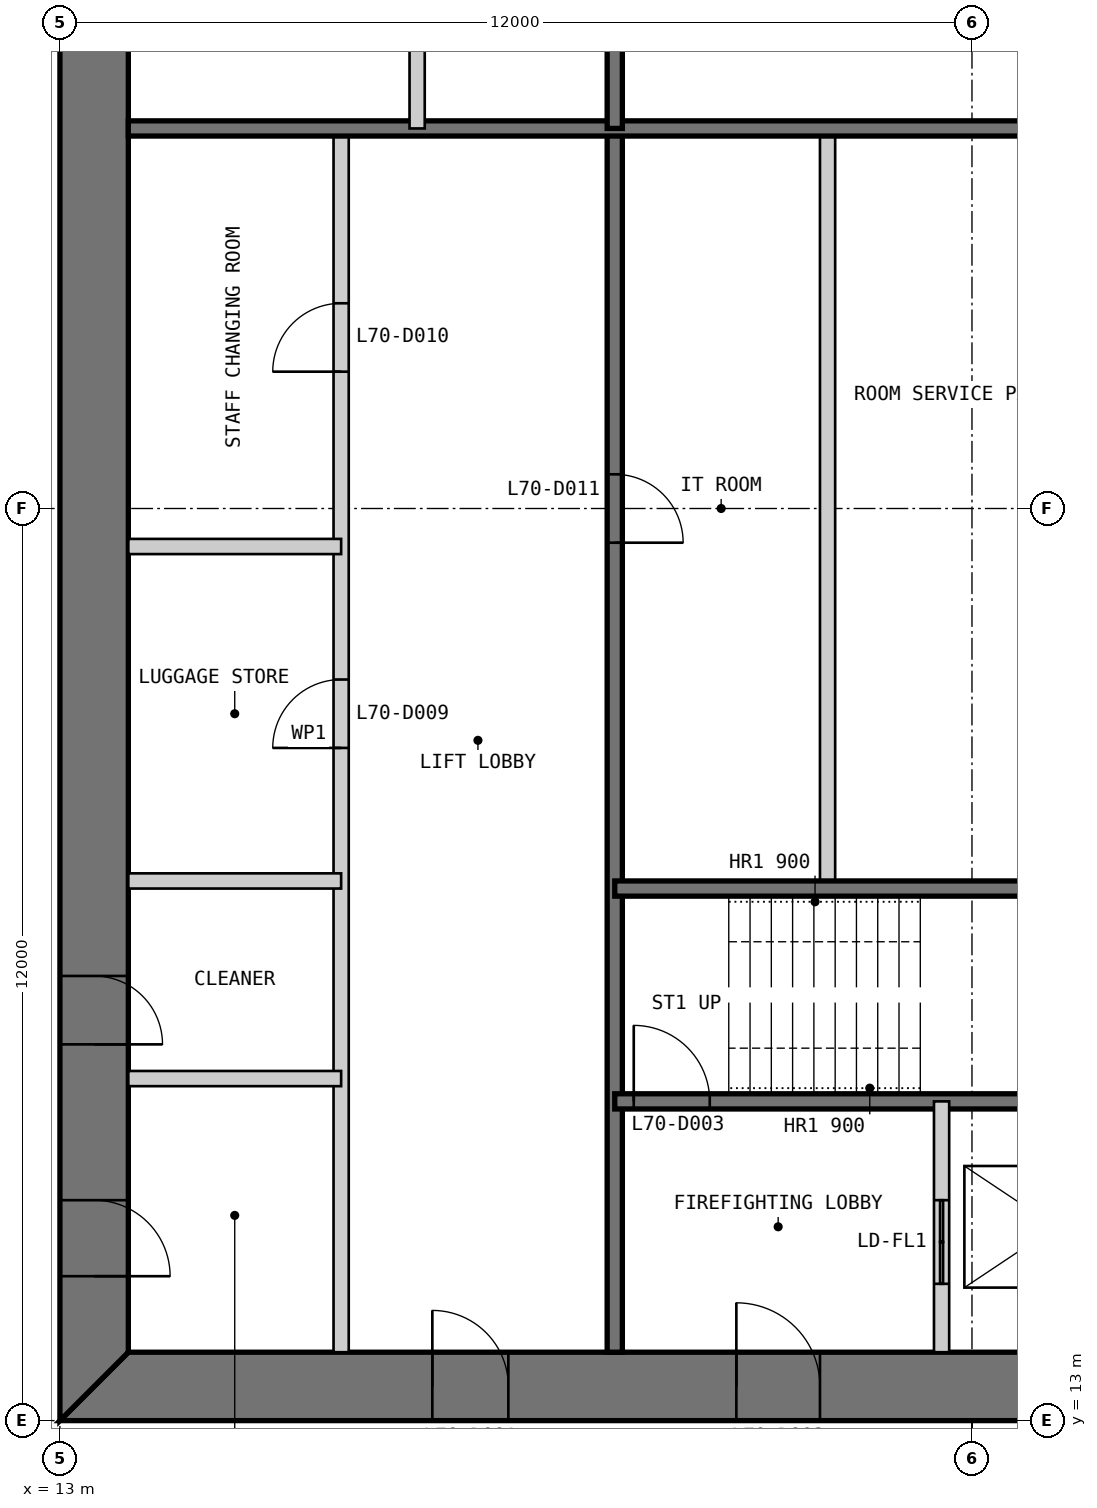
"""IFC4 building model, lengths in metres.
Left out: names, types, materials, properties, quantities, classifications, styles, units other than length and angle.
Written with IfcOpenShell. Run it as: python <this file> out.ifc"""

import sys

from ifc_helpers import new_model, si_unit, direction, frame, frame_2d, origin, place, context, subcontext, project, spatial, polyline, rectangle, outline, extrude, element, fill, save


model = new_model("IFC4")
c1 = context("Model", 3, precision=1e-05, world=origin(), true_north=direction((0.0, 1.0)))
c2 = subcontext(c1, "Body", "Model", "MODEL_VIEW")
j1 = project(units=[si_unit("LENGTHUNIT", "METRE"), si_unit("PLANEANGLEUNIT", "RADIAN")], contexts=[c1])
p1 = place(None, origin())
s1 = spatial("IfcSite", under=j1, at=p1, CompositionType="ELEMENT")
p2 = place(p1, origin())
s2 = spatial("IfcBuilding", under=s1, at=p2, CompositionType="ELEMENT")
p3 = place(p2, frame((0.0, 0.0, 290.0)))
s3 = spatial("IfcBuildingStorey", under=s2, at=p3, CompositionType="ELEMENT", Elevation=290.0)
p4 = place(p3, frame((13.0, 13.45, 0.0), z_axis=(0.0, 0.0, 1.0), x_axis=(1.0, 0.0, 0.0)))
e1 = element("IfcWall", 1, at=p4, inside=s3, PredefinedType="SHEAR", context=c2, shape_type="SweptSolid", body=[
    extrude(outline(polyline([(0.0, -0.45), (24.0, -0.45), (23.1, 0.45), (0.9, 0.45), (0.0, -0.45)])), origin(), (0.0, 0.0, 1.0), 3.4),
])
p5 = place(p4, frame((4.9, 0.0, 0.0)))
e2 = element("IfcOpeningElement", 2, at=p5, cuts=e1, PredefinedType="OPENING", context=c2, shape_type="SweptSolid", body=[
    extrude(rectangle(XDim=1.0, YDim=2.2, at=frame_2d((0.5, 1.1))), frame((0.0, 0.46, 0.0), z_axis=(0.0, -1.0, 0.0), x_axis=(1.0, 0.0, 0.0)), (0.0, 0.0, 1.0), 0.92),
])
p6 = place(p4, frame((8.9, 0.0, 0.0)))
e3 = element("IfcOpeningElement", 3, at=p6, cuts=e1, PredefinedType="OPENING", context=c2, shape_type="SweptSolid", body=[
    extrude(rectangle(XDim=1.1, YDim=2.2, at=frame_2d((0.55, 1.1))), frame((0.0, 0.46, 0.0), z_axis=(0.0, -1.0, 0.0), x_axis=(1.0, 0.0, 0.0)), (0.0, 0.0, 1.0), 0.92),
])
p7 = place(p4, frame((15.05, 0.0, 0.0)))
e4 = element("IfcOpeningElement", 4, at=p7, cuts=e1, PredefinedType="OPENING", context=c2, shape_type="SweptSolid", body=[
    extrude(rectangle(XDim=0.9, YDim=2.2, at=frame_2d((0.45, 1.1))), frame((0.0, 0.46, 0.0), z_axis=(0.0, -1.0, 0.0), x_axis=(1.0, 0.0, 0.0)), (0.0, 0.0, 1.0), 0.92),
])
p8 = place(p4, frame((17.9, 0.0, 0.0)))
e5 = element("IfcOpeningElement", 5, at=p8, cuts=e1, PredefinedType="OPENING", context=c2, shape_type="SweptSolid", body=[
    extrude(rectangle(XDim=1.0, YDim=2.2, at=frame_2d((0.5, 1.1))), frame((0.0, 0.46, 0.0), z_axis=(0.0, -1.0, 0.0), x_axis=(1.0, 0.0, 0.0)), (0.0, 0.0, 1.0), 0.92),
])
p9 = place(p4, frame((21.4, 0.0, 0.0)))
e6 = element("IfcOpeningElement", 6, at=p9, cuts=e1, PredefinedType="OPENING", context=c2, shape_type="SweptSolid", body=[
    extrude(rectangle(XDim=1.0, YDim=2.2, at=frame_2d((0.5, 1.1))), frame((0.0, 0.46, 0.0), z_axis=(0.0, -1.0, 0.0), x_axis=(1.0, 0.0, 0.0)), (0.0, 0.0, 1.0), 0.92),
])
p10 = place(p3, frame((13.45, 36.1, 0.0), z_axis=(0.0, 0.0, 1.0), x_axis=(0.0, -1.0, 0.0)))
e7 = element("IfcWall", 7, at=p10, inside=s3, PredefinedType="SHEAR", context=c2, shape_type="SweptSolid", body=[
    extrude(outline(polyline([(-0.9, -0.45), (23.1, -0.45), (22.2, 0.45), (0.0, 0.45), (-0.9, -0.45)])), origin(), (0.0, 0.0, 1.0), 3.4),
])
p11 = place(p10, frame((20.2, 0.0, 0.0)))
e8 = element("IfcOpeningElement", 8, at=p11, cuts=e7, PredefinedType="OPENING", context=c2, shape_type="SweptSolid", body=[
    extrude(rectangle(XDim=1.0, YDim=2.2, at=frame_2d((0.5, 1.1))), frame((0.0, 0.46, 0.0), z_axis=(0.0, -1.0, 0.0), x_axis=(1.0, 0.0, 0.0)), (0.0, 0.0, 1.0), 0.92),
])
p12 = place(p10, frame((17.25, 0.0, 0.0)))
e9 = element("IfcOpeningElement", 9, at=p12, cuts=e7, PredefinedType="OPENING", context=c2, shape_type="SweptSolid", body=[
    extrude(rectangle(XDim=0.9, YDim=2.2, at=frame_2d((0.45, 1.1))), frame((0.0, 0.46, 0.0), z_axis=(0.0, -1.0, 0.0), x_axis=(1.0, 0.0, 0.0)), (0.0, 0.0, 1.0), 0.92),
])
p13 = place(p3, frame((16.7, 13.9, 0.0), z_axis=(0.0, 0.0, 1.0), x_axis=(0.0, 1.0, 0.0)))
e10 = element("IfcWall", 10, at=p13, inside=s3, PredefinedType="PARTITIONING", context=c2, shape_type="SweptSolid", body=[
    extrude(rectangle(XDim=16.1, YDim=0.2, at=frame_2d((8.05, 0.0))), origin(), (0.0, 0.0, 1.0), 3.2),
])
p14 = place(p13, frame((7.95, 0.0, 0.0)))
e11 = element("IfcOpeningElement", 11, at=p14, cuts=e10, PredefinedType="OPENING", context=c2, shape_type="SweptSolid", body=[
    extrude(rectangle(XDim=0.9, YDim=2.2, at=frame_2d((0.45, 1.1))), frame((0.0, 0.11, 0.0), z_axis=(0.0, -1.0, 0.0), x_axis=(1.0, 0.0, 0.0)), (0.0, 0.0, 1.0), 0.22),
])
p15 = place(p13, frame((12.9, 0.0, 0.0)))
e12 = element("IfcOpeningElement", 12, at=p15, cuts=e10, PredefinedType="OPENING", context=c2, shape_type="SweptSolid", body=[
    extrude(rectangle(XDim=0.9, YDim=2.2, at=frame_2d((0.45, 1.1))), frame((0.0, 0.11, 0.0), z_axis=(0.0, -1.0, 0.0), x_axis=(1.0, 0.0, 0.0)), (0.0, 0.0, 1.0), 0.22),
])
p16 = place(p3, frame((20.3, 13.9, 0.0), z_axis=(0.0, 0.0, 1.0), x_axis=(0.0, 1.0, 0.0)))
e13 = element("IfcWall", 13, at=p16, inside=s3, PredefinedType="SOLIDWALL", context=c2, shape_type="SweptSolid", body=[
    extrude(rectangle(XDim=16.1, YDim=0.2, at=frame_2d((8.05, 0.0))), origin(), (0.0, 0.0, 1.0), 3.2),
])
p17 = place(p16, frame((10.65, 0.0, 0.0)))
e14 = element("IfcOpeningElement", 14, at=p17, cuts=e13, PredefinedType="OPENING", context=c2, shape_type="SweptSolid", body=[
    extrude(rectangle(XDim=0.9, YDim=2.2, at=frame_2d((0.45, 1.1))), frame((0.0, 0.11, 0.0), z_axis=(0.0, -1.0, 0.0), x_axis=(1.0, 0.0, 0.0)), (0.0, 0.0, 1.0), 0.22),
])
p18 = place(p3, frame((23.1, 20.0, 0.0), z_axis=(0.0, 0.0, 1.0), x_axis=(0.0, 1.0, 0.0)))
e15 = element("IfcWall", 15, at=p18, inside=s3, PredefinedType="PARTITIONING", context=c2, shape_type="SweptSolid", body=[
    extrude(rectangle(XDim=10.0, YDim=0.2, at=frame_2d((5.0, 0.0))), origin(), (0.0, 0.0, 1.0), 3.2),
])
p19 = place(p3, frame((20.3, 17.2, 0.0), z_axis=(0.0, 0.0, 1.0), x_axis=(1.0, 0.0, 0.0)))
e16 = element("IfcWall", 16, at=p19, inside=s3, PredefinedType="SOLIDWALL", context=c2, shape_type="SweptSolid", body=[
    extrude(rectangle(XDim=9.4, YDim=0.2, at=frame_2d((4.7, 0.0))), origin(), (0.0, 0.0, 1.0), 3.2),
])
p20 = place(p19, frame((0.25, 0.0, 0.0)))
e17 = element("IfcOpeningElement", 17, at=p20, cuts=e16, PredefinedType="OPENING", context=c2, shape_type="SweptSolid", body=[
    extrude(rectangle(XDim=1.0, YDim=2.2, at=frame_2d((0.5, 1.1))), frame((0.0, 0.11, 0.0), z_axis=(0.0, -1.0, 0.0), x_axis=(1.0, 0.0, 0.0)), (0.0, 0.0, 1.0), 0.22),
])
p21 = place(p3, frame((20.3, 20.0, 0.0), z_axis=(0.0, 0.0, 1.0), x_axis=(1.0, 0.0, 0.0)))
e18 = element("IfcWall", 18, at=p21, inside=s3, PredefinedType="SOLIDWALL", context=c2, shape_type="SweptSolid", body=[
    extrude(rectangle(XDim=15.8, YDim=0.2, at=frame_2d((7.9, 0.0))), origin(), (0.0, 0.0, 1.0), 3.2),
])
p22 = place(p3, frame((24.6, 13.9, 0.0), z_axis=(0.0, 0.0, 1.0), x_axis=(0.0, 1.0, 0.0)))
e19 = element("IfcWall", 19, at=p22, inside=s3, PredefinedType="PARTITIONING", context=c2, shape_type="SweptSolid", body=[
    extrude(rectangle(XDim=3.3, YDim=0.2, at=frame_2d((1.65, 0.0))), origin(), (0.0, 0.0, 1.0), 3.2),
])
p23 = place(p22, frame((0.9, 0.0, 0.0)))
e20 = element("IfcOpeningElement", 20, at=p23, cuts=e19, PredefinedType="OPENING", context=c2, shape_type="SweptSolid", body=[
    extrude(rectangle(XDim=1.1, YDim=2.2, at=frame_2d((0.55, 1.1))), frame((0.0, 0.11, 0.0), z_axis=(0.0, -1.0, 0.0), x_axis=(1.0, 0.0, 0.0)), (0.0, 0.0, 1.0), 0.22),
])
for number, where, z_axis, x_axis in (
    (21, (13.9, 17.5, 0.0), (0.0, 0.0, 1.0), (1.0, 0.0, 0.0)),
    (22, (13.9, 20.1, 0.0), (0.0, 0.0, 1.0), (1.0, 0.0, 0.0)),
    (23, (13.9, 24.5, 0.0), (0.0, 0.0, 1.0), (1.0, 0.0, 0.0)),
):
    element("IfcWall", number, at=place(p3, frame(where, z_axis=z_axis, x_axis=x_axis)), inside=s3, PredefinedType="PARTITIONING", context=c2, shape_type="SweptSolid", body=[
        extrude(rectangle(XDim=2.8, YDim=0.2, at=frame_2d((1.4, 0.0))), origin(), (0.0, 0.0, 1.0), 3.2),
    ])
p24 = place(p3, frame((29.7, 30.0, 0.0), z_axis=(0.0, 0.0, 1.0), x_axis=(-1.0, 0.0, 0.0)))
e24 = element("IfcWall", 24, at=p24, inside=s3, PredefinedType="SOLIDWALL", context=c2, shape_type="SweptSolid", body=[
    extrude(rectangle(XDim=15.8, YDim=0.2, at=frame_2d((7.9, 0.0))), origin(), (0.0, 0.0, 1.0), 3.2),
])
p25 = place(p3, frame((20.3, 36.1, 0.0), z_axis=(0.0, 0.0, 1.0), x_axis=(0.0, -1.0, 0.0)))
e25 = element("IfcWall", 25, at=p25, inside=s3, PredefinedType="SOLIDWALL", context=c2, shape_type="SweptSolid", body=[
    extrude(rectangle(XDim=6.1, YDim=0.2, at=frame_2d((3.05, 0.0))), origin(), (0.0, 0.0, 1.0), 3.2),
])
p26 = place(p3, frame((17.7, 36.1, 0.0), z_axis=(0.0, 0.0, 1.0), x_axis=(0.0, -1.0, 0.0)))
e26 = element("IfcWall", 26, at=p26, inside=s3, PredefinedType="PARTITIONING", context=c2, shape_type="SweptSolid", body=[
    extrude(rectangle(XDim=6.1, YDim=0.2, at=frame_2d((3.05, 0.0))), origin(), (0.0, 0.0, 1.0), 3.2),
])
p27 = place(p5, origin())
e27 = element("IfcDoor", 27, at=p27, inside=s3, OperationType="SINGLE_SWING_LEFT", PredefinedType="DOOR", context=c2, shape_type="SweptSolid", body=[
    extrude(rectangle(XDim=1.0, YDim=2.2, at=frame_2d((0.5, 1.1))), frame((0.0, 0.025, 0.0), z_axis=(0.0, -1.0, 0.0), x_axis=(1.0, 0.0, 0.0)), (0.0, 0.0, 1.0), 0.05),
    extrude(outline(polyline([(0.0, 0.0), (0.04, 0.0), (0.04, 2.16), (0.96, 2.16), (0.96, 0.0), (1.0, 0.0), (1.0, 2.2), (0.0, 2.2), (0.0, 0.0)])), frame((0.0, 0.3, 0.0), z_axis=(0.0, -1.0, 0.0), x_axis=(1.0, 0.0, 0.0)), (0.0, 0.0, 1.0), 0.6),
])
fill(e2, e27)
p28 = place(p6, origin())
e28 = element("IfcDoor", 28, at=p28, inside=s3, OperationType="SINGLE_SWING_LEFT", PredefinedType="DOOR", context=c2, shape_type="SweptSolid", body=[
    extrude(rectangle(XDim=1.1, YDim=2.2, at=frame_2d((0.55, 1.1))), frame((0.0, 0.025, 0.0), z_axis=(0.0, -1.0, 0.0), x_axis=(1.0, 0.0, 0.0)), (0.0, 0.0, 1.0), 0.05),
    extrude(outline(polyline([(0.0, 0.0), (0.04, 0.0), (0.04, 2.16), (1.06, 2.16), (1.06, 0.0), (1.1, 0.0), (1.1, 2.2), (0.0, 2.2), (0.0, 0.0)])), frame((0.0, 0.3, 0.0), z_axis=(0.0, -1.0, 0.0), x_axis=(1.0, 0.0, 0.0)), (0.0, 0.0, 1.0), 0.6),
])
fill(e3, e28)
p29 = place(p20, origin())
e29 = element("IfcDoor", 29, at=p29, inside=s3, OperationType="SINGLE_SWING_LEFT", PredefinedType="DOOR", context=c2, shape_type="SweptSolid", body=[
    extrude(rectangle(XDim=1.0, YDim=2.2, at=frame_2d((0.5, 1.1))), frame((0.0, 0.025, 0.0), z_axis=(0.0, -1.0, 0.0), x_axis=(1.0, 0.0, 0.0)), (0.0, 0.0, 1.0), 0.05),
])
fill(e17, e29)
p30 = place(p11, origin())
e30 = element("IfcDoor", 30, at=p30, inside=s3, OperationType="SINGLE_SWING_RIGHT", PredefinedType="DOOR", context=c2, shape_type="SweptSolid", body=[
    extrude(rectangle(XDim=1.0, YDim=2.2, at=frame_2d((0.5, 1.1))), frame((0.0, 0.025, 0.0), z_axis=(0.0, -1.0, 0.0), x_axis=(1.0, 0.0, 0.0)), (0.0, 0.0, 1.0), 0.05),
    extrude(outline(polyline([(0.0, 0.0), (0.04, 0.0), (0.04, 2.16), (0.96, 2.16), (0.96, 0.0), (1.0, 0.0), (1.0, 2.2), (0.0, 2.2), (0.0, 0.0)])), frame((0.0, 0.3, 0.0), z_axis=(0.0, -1.0, 0.0), x_axis=(1.0, 0.0, 0.0)), (0.0, 0.0, 1.0), 0.6),
])
fill(e8, e30)
p31 = place(p12, origin())
e31 = element("IfcDoor", 31, at=p31, inside=s3, OperationType="SINGLE_SWING_RIGHT", PredefinedType="DOOR", context=c2, shape_type="SweptSolid", body=[
    extrude(rectangle(XDim=0.9, YDim=2.2, at=frame_2d((0.45, 1.1))), frame((0.0, 0.025, 0.0), z_axis=(0.0, -1.0, 0.0), x_axis=(1.0, 0.0, 0.0)), (0.0, 0.0, 1.0), 0.05),
    extrude(outline(polyline([(0.0, 0.0), (0.04, 0.0), (0.04, 2.16), (0.86, 2.16), (0.86, 0.0), (0.9, 0.0), (0.9, 2.2), (0.0, 2.2), (0.0, 0.0)])), frame((0.0, 0.3, 0.0), z_axis=(0.0, -1.0, 0.0), x_axis=(1.0, 0.0, 0.0)), (0.0, 0.0, 1.0), 0.6),
])
fill(e9, e31)
p32 = place(p14, origin())
e32 = element("IfcDoor", 32, at=p32, inside=s3, OperationType="SINGLE_SWING_LEFT", PredefinedType="DOOR", context=c2, shape_type="SweptSolid", body=[
    extrude(rectangle(XDim=0.9, YDim=2.2, at=frame_2d((0.45, 1.1))), frame((0.0, 0.025, 0.0), z_axis=(0.0, -1.0, 0.0), x_axis=(1.0, 0.0, 0.0)), (0.0, 0.0, 1.0), 0.05),
])
fill(e11, e32)
p33 = place(p15, origin())
e33 = element("IfcDoor", 33, at=p33, inside=s3, OperationType="SINGLE_SWING_LEFT", PredefinedType="DOOR", context=c2, shape_type="SweptSolid", body=[
    extrude(rectangle(XDim=0.9, YDim=2.2, at=frame_2d((0.45, 1.1))), frame((0.0, 0.025, 0.0), z_axis=(0.0, -1.0, 0.0), x_axis=(1.0, 0.0, 0.0)), (0.0, 0.0, 1.0), 0.05),
])
fill(e12, e33)
p34 = place(p17, frame((0.9, 0.0, 0.0), z_axis=(0.0, 0.0, 1.0), x_axis=(-1.0, 0.0, 0.0)))
e34 = element("IfcDoor", 34, at=p34, inside=s3, OperationType="SINGLE_SWING_RIGHT", PredefinedType="DOOR", context=c2, shape_type="SweptSolid", body=[
    extrude(rectangle(XDim=0.9, YDim=2.2, at=frame_2d((0.45, 1.1))), frame((0.0, 0.025, 0.0), z_axis=(0.0, -1.0, 0.0), x_axis=(1.0, 0.0, 0.0)), (0.0, 0.0, 1.0), 0.05),
])
fill(e14, e34)
p35 = place(p23, origin())
e35 = element("IfcDoor", 35, at=p35, inside=s3, OperationType="DOUBLE_DOOR_SLIDING", PredefinedType="DOOR", context=c2, shape_type="SweptSolid", body=[
    extrude(rectangle(XDim=1.1, YDim=2.2, at=frame_2d((0.55, 1.1))), frame((0.0, 0.025, 0.0), z_axis=(0.0, -1.0, 0.0), x_axis=(1.0, 0.0, 0.0)), (0.0, 0.0, 1.0), 0.05),
])
fill(e20, e35)
save(model, sys.argv[1])
